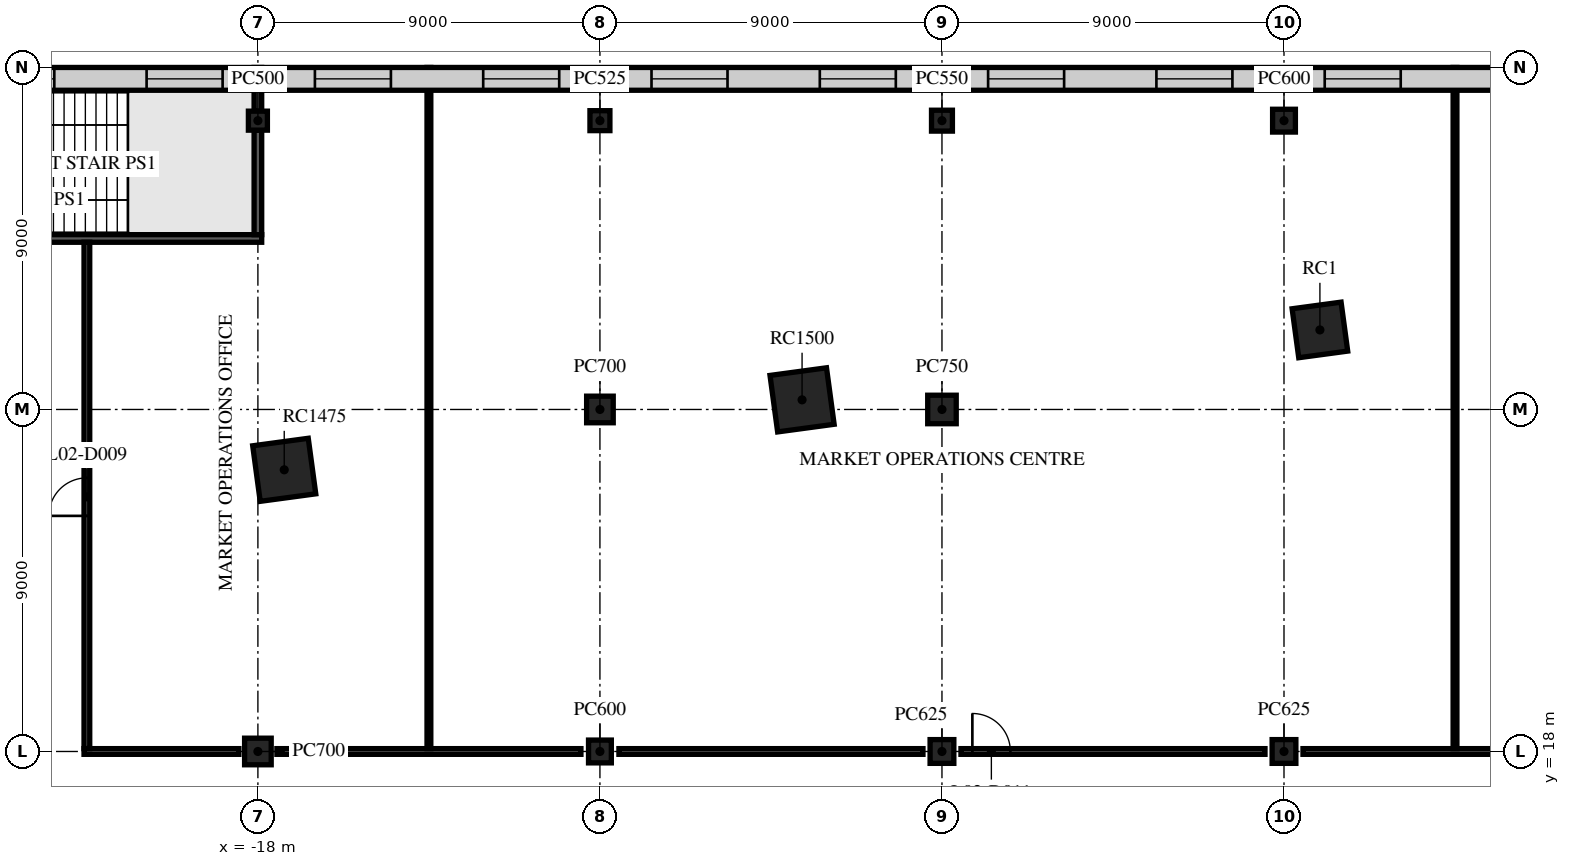
"""IFC4 building model, lengths in metres.
Left out: names, types, materials, properties, quantities, classifications, styles, units other than length and angle.
Written with IfcOpenShell. Run it as: python <this file> out.ifc"""

import sys

from ifc_helpers import new_model, si_unit, direction, frame, frame_2d, origin, origin_2d, place, context, subcontext, project, spatial, rectangle, extrude, element, fill, save


model = new_model("IFC4")
c1 = context("Model", 3, precision=1e-05, world=origin(), true_north=direction((0.0, 1.0)))
c2 = subcontext(c1, "Body", "Model", "MODEL_VIEW")
j1 = project(units=[si_unit("LENGTHUNIT", "METRE"), si_unit("PLANEANGLEUNIT", "RADIAN")], contexts=[c1])
p1 = place(None, origin())
s1 = spatial("IfcSite", under=j1, at=p1, CompositionType="ELEMENT")
p2 = place(p1, origin())
s2 = spatial("IfcBuilding", under=s1, at=p2, CompositionType="ELEMENT")
p3 = place(p2, frame((0.0, 0.0, 9.0)))
s3 = spatial("IfcBuildingStorey", under=s2, at=p3, CompositionType="ELEMENT", Elevation=9.0)
p4 = place(p3, frame((-18.0, 18.0, 0.0), z_axis=(0.0, 0.0, 1.0), x_axis=(1.0, 0.0, 0.0)))
e1 = element("IfcColumn", 1, at=p4, inside=s3, PredefinedType="COLUMN", context=c2, shape_type="SweptSolid", body=[
    extrude(rectangle(XDim=0.7, YDim=0.7, at=origin_2d()), origin(), (0.0, 0.0, 1.0), 4.5),
])
p5 = place(p3, frame((-18.0, 34.6, 0.0), z_axis=(0.0, 0.0, 1.0), x_axis=(1.0, 0.0, 0.0)))
e2 = element("IfcColumn", 2, at=p5, inside=s3, PredefinedType="COLUMN", context=c2, shape_type="SweptSolid", body=[
    extrude(rectangle(XDim=0.5, YDim=0.5, at=origin_2d()), origin(), (0.0, 0.0, 1.0), 4.5),
])
p6 = place(p3, frame((-9.0, 18.0, 0.0), z_axis=(0.0, 0.0, 1.0), x_axis=(1.0, 0.0, 0.0)))
e3 = element("IfcColumn", 3, at=p6, inside=s3, PredefinedType="COLUMN", context=c2, shape_type="SweptSolid", body=[
    extrude(rectangle(XDim=0.6, YDim=0.6, at=origin_2d()), origin(), (0.0, 0.0, 1.0), 4.5),
])
p7 = place(p3, frame((-9.0, 27.0, 0.0), z_axis=(0.0, 0.0, 1.0), x_axis=(1.0, 0.0, 0.0)))
e4 = element("IfcColumn", 4, at=p7, inside=s3, PredefinedType="COLUMN", context=c2, shape_type="SweptSolid", body=[
    extrude(rectangle(XDim=0.7, YDim=0.7, at=origin_2d()), origin(), (0.0, 0.0, 1.0), 4.5),
])
p8 = place(p3, frame((-9.0, 34.6, 0.0), z_axis=(0.0, 0.0, 1.0), x_axis=(1.0, 0.0, 0.0)))
e5 = element("IfcColumn", 5, at=p8, inside=s3, PredefinedType="COLUMN", context=c2, shape_type="SweptSolid", body=[
    extrude(rectangle(XDim=0.525, YDim=0.525, at=origin_2d()), origin(), (0.0, 0.0, 1.0), 4.5),
])
p9 = place(p3, frame((0.0, 18.0, 0.0), z_axis=(0.0, 0.0, 1.0), x_axis=(1.0, 0.0, 0.0)))
e6 = element("IfcColumn", 6, at=p9, inside=s3, PredefinedType="COLUMN", context=c2, shape_type="SweptSolid", body=[
    extrude(rectangle(XDim=0.625, YDim=0.625, at=origin_2d()), origin(), (0.0, 0.0, 1.0), 4.5),
])
p10 = place(p3, frame((0.0, 27.0, 0.0), z_axis=(0.0, 0.0, 1.0), x_axis=(1.0, 0.0, 0.0)))
e7 = element("IfcColumn", 7, at=p10, inside=s3, PredefinedType="COLUMN", context=c2, shape_type="SweptSolid", body=[
    extrude(rectangle(XDim=0.75, YDim=0.75, at=origin_2d()), origin(), (0.0, 0.0, 1.0), 4.5),
])
p11 = place(p3, frame((0.0, 34.6, 0.0), z_axis=(0.0, 0.0, 1.0), x_axis=(1.0, 0.0, 0.0)))
e8 = element("IfcColumn", 8, at=p11, inside=s3, PredefinedType="COLUMN", context=c2, shape_type="SweptSolid", body=[
    extrude(rectangle(XDim=0.55, YDim=0.55, at=origin_2d()), origin(), (0.0, 0.0, 1.0), 4.5),
])
p12 = place(p3, frame((9.0, 18.0, 0.0), z_axis=(0.0, 0.0, 1.0), x_axis=(1.0, 0.0, 0.0)))
e9 = element("IfcColumn", 9, at=p12, inside=s3, PredefinedType="COLUMN", context=c2, shape_type="SweptSolid", body=[
    extrude(rectangle(XDim=0.625, YDim=0.625, at=origin_2d()), origin(), (0.0, 0.0, 1.0), 4.5),
])
p13 = place(p3, frame((9.0, 34.6, 0.0), z_axis=(0.0, 0.0, 1.0), x_axis=(1.0, 0.0, 0.0)))
e10 = element("IfcColumn", 10, at=p13, inside=s3, PredefinedType="COLUMN", context=c2, shape_type="SweptSolid", body=[
    extrude(rectangle(XDim=0.6, YDim=0.6, at=origin_2d()), origin(), (0.0, 0.0, 1.0), 4.5),
])
p14 = place(p3, frame((9.945, 29.093, 0.0), z_axis=(0.0, 0.0, 1.0), x_axis=(0.991001197216, 0.133853005627, 0.0)))
e11 = element("IfcColumn", 11, at=p14, inside=s3, PredefinedType="COLUMN", context=c2, shape_type="SweptSolid", body=[
    extrude(rectangle(XDim=1.3, YDim=1.3, at=origin_2d()), origin(), (0.0, 0.0, 1.0), 4.5),
])
p15 = place(p3, frame((-3.681, 27.253, 0.0), z_axis=(0.0, 0.0, 1.0), x_axis=(0.991001197216, 0.133853005627, 0.0)))
e12 = element("IfcColumn", 12, at=p15, inside=s3, PredefinedType="COLUMN", context=c2, shape_type="SweptSolid", body=[
    extrude(rectangle(XDim=1.5, YDim=1.5, at=origin_2d()), origin(), (0.0, 0.0, 1.0), 4.5),
])
p16 = place(p3, frame((-17.307, 25.412, 0.0), z_axis=(0.0, 0.0, 1.0), x_axis=(0.991001197216, 0.133853005627, 0.0)))
e13 = element("IfcColumn", 13, at=p16, inside=s3, PredefinedType="COLUMN", context=c2, shape_type="SweptSolid", body=[
    extrude(rectangle(XDim=1.475, YDim=1.475, at=origin_2d()), origin(), (0.0, 0.0, 1.0), 4.5),
])
p17 = place(p3, frame((-22.575, 18.0, 0.0), z_axis=(0.0, 0.0, 1.0), x_axis=(1.0, 0.0, 0.0)))
e14 = element("IfcWall", 14, at=p17, inside=s3, PredefinedType="PARTITIONING", context=c2, shape_type="SweptSolid", body=[
    extrude(rectangle(XDim=4.075, YDim=0.15, at=frame_2d((2.038, 0.0))), origin(), (0.0, 0.0, 1.0), 4.1),
])
for number, where, z_axis, x_axis in (
    (15, (-17.5, 18.0, 0.0), (0.0, 0.0, 1.0), (1.0, 0.0, 0.0)),
    (16, (-8.5, 18.0, 0.0), (0.0, 0.0, 1.0), (1.0, 0.0, 0.0)),
):
    element("IfcWall", number, at=place(p3, frame(where, z_axis=z_axis, x_axis=x_axis)), inside=s3, PredefinedType="PARTITIONING", context=c2, shape_type="SweptSolid", body=[
        extrude(rectangle(XDim=8.0, YDim=0.15, at=frame_2d((4.0, 0.0))), origin(), (0.0, 0.0, 1.0), 4.1),
    ])
p18 = place(p3, frame((0.5, 18.0, 0.0), z_axis=(0.0, 0.0, 1.0), x_axis=(1.0, 0.0, 0.0)))
e17 = element("IfcWall", 17, at=p18, inside=s3, PredefinedType="PARTITIONING", context=c2, shape_type="SweptSolid", body=[
    extrude(rectangle(XDim=8.0, YDim=0.15, at=frame_2d((4.0, 0.0))), origin(), (0.0, 0.0, 1.0), 4.1),
])
p19 = place(p18, frame((0.3, 0.0, 0.0)))
e18 = element("IfcOpeningElement", 18, at=p19, cuts=e17, PredefinedType="OPENING", context=c2, shape_type="SweptSolid", body=[
    extrude(rectangle(XDim=1.0, YDim=2.1, at=frame_2d((0.5, 1.05))), frame((0.0, 0.085, 0.0), z_axis=(0.0, -1.0, 0.0), x_axis=(1.0, 0.0, 0.0)), (0.0, 0.0, 1.0), 0.17),
])
p20 = place(p3, frame((9.5, 18.0, 0.0), z_axis=(0.0, 0.0, 1.0), x_axis=(1.0, 0.0, 0.0)))
e19 = element("IfcWall", 19, at=p20, inside=s3, PredefinedType="PARTITIONING", context=c2, shape_type="SweptSolid", body=[
    extrude(rectangle(XDim=8.0, YDim=0.15, at=frame_2d((4.0, 0.0))), origin(), (0.0, 0.0, 1.0), 4.1),
])
p21 = place(p3, frame((-27.075, 31.5, 0.0), z_axis=(0.0, 0.0, 1.0), x_axis=(1.0, 0.0, 0.0)))
e20 = element("IfcWall", 20, at=p21, inside=s3, PredefinedType="PARTITIONING", context=c2, shape_type="SweptSolid", body=[
    extrude(rectangle(XDim=9.175, YDim=0.2, at=frame_2d((4.587, 0.0))), origin(), (0.0, 0.0, 1.0), 4.1),
])
p22 = place(p21, frame((0.875, 0.0, 0.0)))
e21 = element("IfcOpeningElement", 21, at=p22, cuts=e20, PredefinedType="OPENING", context=c2, shape_type="SweptSolid", body=[
    extrude(rectangle(XDim=1.2, YDim=2.1, at=frame_2d((0.6, 1.05))), frame((0.0, 0.11, 0.0), z_axis=(0.0, -1.0, 0.0), x_axis=(1.0, 0.0, 0.0)), (0.0, 0.0, 1.0), 0.22),
])
p23 = place(p3, frame((-22.5, 18.075, 0.0), z_axis=(0.0, 0.0, 1.0), x_axis=(0.0, 1.0, 0.0)))
e22 = element("IfcWall", 22, at=p23, inside=s3, PredefinedType="PARTITIONING", context=c2, shape_type="SweptSolid", body=[
    extrude(rectangle(XDim=13.325, YDim=0.15, at=frame_2d((6.663, 0.0))), origin(), (0.0, 0.0, 1.0), 4.1),
])
p24 = place(p23, frame((6.125, 0.0, 0.0)))
e23 = element("IfcOpeningElement", 23, at=p24, cuts=e22, PredefinedType="OPENING", context=c2, shape_type="SweptSolid", body=[
    extrude(rectangle(XDim=1.0, YDim=2.1, at=frame_2d((0.5, 1.05))), frame((0.0, 0.085, 0.0), z_axis=(0.0, -1.0, 0.0), x_axis=(1.0, 0.0, 0.0)), (0.0, 0.0, 1.0), 0.17),
])
p25 = place(p3, frame((-18.0, 31.6, 0.0), z_axis=(0.0, 0.0, 1.0), x_axis=(0.0, 1.0, 0.0)))
e24 = element("IfcWall", 24, at=p25, inside=s3, PredefinedType="PARTITIONING", context=c2, shape_type="SweptSolid", body=[
    extrude(rectangle(XDim=2.75, YDim=0.2, at=frame_2d((1.375, 0.0))), origin(), (0.0, 0.0, 1.0), 4.1),
])
p26 = place(p3, frame((-18.0, 34.85, 0.0), z_axis=(0.0, 0.0, 1.0), x_axis=(0.0, 1.0, 0.0)))
e25 = element("IfcWall", 25, at=p26, inside=s3, PredefinedType="PARTITIONING", context=c2, shape_type="SweptSolid", body=[
    extrude(rectangle(XDim=1.15, YDim=0.2, at=frame_2d((0.575, 0.0))), origin(), (0.0, 0.0, 1.0), 4.1),
])
for number, where, z_axis, x_axis in (
    (26, (-13.5, 18.075, 0.0), (0.0, 0.0, 1.0), (0.0, 1.0, 0.0)),
    (27, (13.5, 18.075, 0.0), (0.0, 0.0, 1.0), (0.0, 1.0, 0.0)),
):
    element("IfcWall", number, at=place(p3, frame(where, z_axis=z_axis, x_axis=x_axis)), inside=s3, PredefinedType="PARTITIONING", context=c2, shape_type="SweptSolid", body=[
        extrude(rectangle(XDim=17.925, YDim=0.1, at=frame_2d((8.962, 0.0))), origin(), (0.0, 0.0, 1.0), 4.1),
    ])
p27 = place(p3, frame((30.876, 35.7, 0.0), z_axis=(0.0, 0.0, 1.0), x_axis=(-1.0, 0.0, 0.0)))
e28 = element("IfcWall", 28, at=p27, inside=s3, PredefinedType="STANDARD", context=c2, shape_type="SweptSolid", body=[
    extrude(rectangle(XDim=61.751, YDim=0.6, at=frame_2d((30.876, 0.0))), origin(), (0.0, 0.0, 1.0), 4.1),
])
p28 = place(p27, frame((1.152, 0.0, 0.9)))
e29 = element("IfcOpeningElement", 29, at=p28, cuts=e28, PredefinedType="OPENING", context=c2, shape_type="SweptSolid", body=[
    extrude(rectangle(XDim=2.0, YDim=3.0, at=frame_2d((1.0, 1.5))), frame((0.0, 0.31, 0.0), z_axis=(0.0, -1.0, 0.0), x_axis=(1.0, 0.0, 0.0)), (0.0, 0.0, 1.0), 0.62),
])
p29 = place(p27, frame((5.519, 0.0, 0.9)))
e30 = element("IfcOpeningElement", 30, at=p29, cuts=e28, PredefinedType="OPENING", context=c2, shape_type="SweptSolid", body=[
    extrude(rectangle(XDim=2.0, YDim=3.0, at=frame_2d((1.0, 1.5))), frame((0.0, 0.31, 0.0), z_axis=(0.0, -1.0, 0.0), x_axis=(1.0, 0.0, 0.0)), (0.0, 0.0, 1.0), 0.62),
])
p30 = place(p27, frame((9.947, 0.0, 0.9)))
e31 = element("IfcOpeningElement", 31, at=p30, cuts=e28, PredefinedType="OPENING", context=c2, shape_type="SweptSolid", body=[
    extrude(rectangle(XDim=2.0, YDim=3.0, at=frame_2d((1.0, 1.5))), frame((0.0, 0.31, 0.0), z_axis=(0.0, -1.0, 0.0), x_axis=(1.0, 0.0, 0.0)), (0.0, 0.0, 1.0), 0.62),
])
p31 = place(p27, frame((14.376, 0.0, 0.9)))
e32 = element("IfcOpeningElement", 32, at=p31, cuts=e28, PredefinedType="OPENING", context=c2, shape_type="SweptSolid", body=[
    extrude(rectangle(XDim=2.0, YDim=3.0, at=frame_2d((1.0, 1.5))), frame((0.0, 0.31, 0.0), z_axis=(0.0, -1.0, 0.0), x_axis=(1.0, 0.0, 0.0)), (0.0, 0.0, 1.0), 0.62),
])
p32 = place(p27, frame((18.804, 0.0, 0.9)))
e33 = element("IfcOpeningElement", 33, at=p32, cuts=e28, PredefinedType="OPENING", context=c2, shape_type="SweptSolid", body=[
    extrude(rectangle(XDim=2.0, YDim=3.0, at=frame_2d((1.0, 1.5))), frame((0.0, 0.31, 0.0), z_axis=(0.0, -1.0, 0.0), x_axis=(1.0, 0.0, 0.0)), (0.0, 0.0, 1.0), 0.62),
])
p33 = place(p27, frame((23.233, 0.0, 0.9)))
e34 = element("IfcOpeningElement", 34, at=p33, cuts=e28, PredefinedType="OPENING", context=c2, shape_type="SweptSolid", body=[
    extrude(rectangle(XDim=2.0, YDim=3.0, at=frame_2d((1.0, 1.5))), frame((0.0, 0.31, 0.0), z_axis=(0.0, -1.0, 0.0), x_axis=(1.0, 0.0, 0.0)), (0.0, 0.0, 1.0), 0.62),
])
p34 = place(p27, frame((27.662, 0.0, 0.9)))
e35 = element("IfcOpeningElement", 35, at=p34, cuts=e28, PredefinedType="OPENING", context=c2, shape_type="SweptSolid", body=[
    extrude(rectangle(XDim=2.0, YDim=3.0, at=frame_2d((1.0, 1.5))), frame((0.0, 0.31, 0.0), z_axis=(0.0, -1.0, 0.0), x_axis=(1.0, 0.0, 0.0)), (0.0, 0.0, 1.0), 0.62),
])
p35 = place(p27, frame((32.09, 0.0, 0.9)))
e36 = element("IfcOpeningElement", 36, at=p35, cuts=e28, PredefinedType="OPENING", context=c2, shape_type="SweptSolid", body=[
    extrude(rectangle(XDim=2.0, YDim=3.0, at=frame_2d((1.0, 1.5))), frame((0.0, 0.31, 0.0), z_axis=(0.0, -1.0, 0.0), x_axis=(1.0, 0.0, 0.0)), (0.0, 0.0, 1.0), 0.62),
])
p36 = place(p27, frame((36.519, 0.0, 0.9)))
e37 = element("IfcOpeningElement", 37, at=p36, cuts=e28, PredefinedType="OPENING", context=c2, shape_type="SweptSolid", body=[
    extrude(rectangle(XDim=2.0, YDim=3.0, at=frame_2d((1.0, 1.5))), frame((0.0, 0.31, 0.0), z_axis=(0.0, -1.0, 0.0), x_axis=(1.0, 0.0, 0.0)), (0.0, 0.0, 1.0), 0.62),
])
p37 = place(p27, frame((40.947, 0.0, 0.9)))
e38 = element("IfcOpeningElement", 38, at=p37, cuts=e28, PredefinedType="OPENING", context=c2, shape_type="SweptSolid", body=[
    extrude(rectangle(XDim=2.0, YDim=3.0, at=frame_2d((1.0, 1.5))), frame((0.0, 0.31, 0.0), z_axis=(0.0, -1.0, 0.0), x_axis=(1.0, 0.0, 0.0)), (0.0, 0.0, 1.0), 0.62),
])
p38 = place(p27, frame((45.376, 0.0, 0.9)))
e39 = element("IfcOpeningElement", 39, at=p38, cuts=e28, PredefinedType="OPENING", context=c2, shape_type="SweptSolid", body=[
    extrude(rectangle(XDim=2.0, YDim=3.0, at=frame_2d((1.0, 1.5))), frame((0.0, 0.31, 0.0), z_axis=(0.0, -1.0, 0.0), x_axis=(1.0, 0.0, 0.0)), (0.0, 0.0, 1.0), 0.62),
])
p39 = place(p27, frame((49.804, 0.0, 0.9)))
e40 = element("IfcOpeningElement", 40, at=p39, cuts=e28, PredefinedType="OPENING", context=c2, shape_type="SweptSolid", body=[
    extrude(rectangle(XDim=2.0, YDim=3.0, at=frame_2d((1.0, 1.5))), frame((0.0, 0.31, 0.0), z_axis=(0.0, -1.0, 0.0), x_axis=(1.0, 0.0, 0.0)), (0.0, 0.0, 1.0), 0.62),
])
p40 = place(p27, frame((54.233, 0.0, 0.9)))
e41 = element("IfcOpeningElement", 41, at=p40, cuts=e28, PredefinedType="OPENING", context=c2, shape_type="SweptSolid", body=[
    extrude(rectangle(XDim=2.0, YDim=3.0, at=frame_2d((1.0, 1.5))), frame((0.0, 0.31, 0.0), z_axis=(0.0, -1.0, 0.0), x_axis=(1.0, 0.0, 0.0)), (0.0, 0.0, 1.0), 0.62),
])
p41 = place(p27, frame((58.599, 0.0, 0.9)))
e42 = element("IfcOpeningElement", 42, at=p41, cuts=e28, PredefinedType="OPENING", context=c2, shape_type="SweptSolid", body=[
    extrude(rectangle(XDim=2.0, YDim=3.0, at=frame_2d((1.0, 1.5))), frame((0.0, 0.31, 0.0), z_axis=(0.0, -1.0, 0.0), x_axis=(1.0, 0.0, 0.0)), (0.0, 0.0, 1.0), 0.62),
])
p42 = place(p24, origin())
e43 = element("IfcDoor", 43, at=p42, inside=s3, OperationType="SINGLE_SWING_LEFT", PredefinedType="DOOR", context=c2, shape_type="SweptSolid", body=[
    extrude(rectangle(XDim=1.0, YDim=2.1, at=frame_2d((0.5, 1.05))), frame((0.0, 0.025, 0.0), z_axis=(0.0, -1.0, 0.0), x_axis=(1.0, 0.0, 0.0)), (0.0, 0.0, 1.0), 0.05),
])
fill(e23, e43)
p43 = place(p19, origin())
e44 = element("IfcDoor", 44, at=p43, inside=s3, OperationType="SINGLE_SWING_LEFT", PredefinedType="DOOR", context=c2, shape_type="SweptSolid", body=[
    extrude(rectangle(XDim=1.0, YDim=2.1, at=frame_2d((0.5, 1.05))), frame((0.0, 0.025, 0.0), z_axis=(0.0, -1.0, 0.0), x_axis=(1.0, 0.0, 0.0)), (0.0, 0.0, 1.0), 0.05),
])
fill(e18, e44)
p44 = place(p32, origin())
e45 = element("IfcWindow", 45, at=p44, inside=s3, PartitioningType="SINGLE_PANEL", PredefinedType="WINDOW", context=c2, shape_type="SweptSolid", body=[
    extrude(rectangle(XDim=2.0, YDim=3.0, at=frame_2d((1.0, 1.5))), frame((0.0, 0.03, 0.0), z_axis=(0.0, -1.0, 0.0), x_axis=(1.0, 0.0, 0.0)), (0.0, 0.0, 1.0), 0.06),
])
fill(e33, e45)
p45 = place(p33, origin())
e46 = element("IfcWindow", 46, at=p45, inside=s3, PartitioningType="SINGLE_PANEL", PredefinedType="WINDOW", context=c2, shape_type="SweptSolid", body=[
    extrude(rectangle(XDim=2.0, YDim=3.0, at=frame_2d((1.0, 1.5))), frame((0.0, 0.03, 0.0), z_axis=(0.0, -1.0, 0.0), x_axis=(1.0, 0.0, 0.0)), (0.0, 0.0, 1.0), 0.06),
])
fill(e34, e46)
p46 = place(p34, origin())
e47 = element("IfcWindow", 47, at=p46, inside=s3, PartitioningType="SINGLE_PANEL", PredefinedType="WINDOW", context=c2, shape_type="SweptSolid", body=[
    extrude(rectangle(XDim=2.0, YDim=3.0, at=frame_2d((1.0, 1.5))), frame((0.0, 0.03, 0.0), z_axis=(0.0, -1.0, 0.0), x_axis=(1.0, 0.0, 0.0)), (0.0, 0.0, 1.0), 0.06),
])
fill(e35, e47)
p47 = place(p35, origin())
e48 = element("IfcWindow", 48, at=p47, inside=s3, PartitioningType="SINGLE_PANEL", PredefinedType="WINDOW", context=c2, shape_type="SweptSolid", body=[
    extrude(rectangle(XDim=2.0, YDim=3.0, at=frame_2d((1.0, 1.5))), frame((0.0, 0.03, 0.0), z_axis=(0.0, -1.0, 0.0), x_axis=(1.0, 0.0, 0.0)), (0.0, 0.0, 1.0), 0.06),
])
fill(e36, e48)
p48 = place(p36, origin())
e49 = element("IfcWindow", 49, at=p48, inside=s3, PartitioningType="SINGLE_PANEL", PredefinedType="WINDOW", context=c2, shape_type="SweptSolid", body=[
    extrude(rectangle(XDim=2.0, YDim=3.0, at=frame_2d((1.0, 1.5))), frame((0.0, 0.03, 0.0), z_axis=(0.0, -1.0, 0.0), x_axis=(1.0, 0.0, 0.0)), (0.0, 0.0, 1.0), 0.06),
])
fill(e37, e49)
p49 = place(p37, origin())
e50 = element("IfcWindow", 50, at=p49, inside=s3, PartitioningType="SINGLE_PANEL", PredefinedType="WINDOW", context=c2, shape_type="SweptSolid", body=[
    extrude(rectangle(XDim=2.0, YDim=3.0, at=frame_2d((1.0, 1.5))), frame((0.0, 0.03, 0.0), z_axis=(0.0, -1.0, 0.0), x_axis=(1.0, 0.0, 0.0)), (0.0, 0.0, 1.0), 0.06),
])
fill(e38, e50)
p50 = place(p38, origin())
e51 = element("IfcWindow", 51, at=p50, inside=s3, PartitioningType="SINGLE_PANEL", PredefinedType="WINDOW", context=c2, shape_type="SweptSolid", body=[
    extrude(rectangle(XDim=2.0, YDim=3.0, at=frame_2d((1.0, 1.5))), frame((0.0, 0.03, 0.0), z_axis=(0.0, -1.0, 0.0), x_axis=(1.0, 0.0, 0.0)), (0.0, 0.0, 1.0), 0.06),
])
fill(e39, e51)
p51 = place(p39, origin())
e52 = element("IfcWindow", 52, at=p51, inside=s3, PartitioningType="SINGLE_PANEL", PredefinedType="WINDOW", context=c2, shape_type="SweptSolid", body=[
    extrude(rectangle(XDim=2.0, YDim=3.0, at=frame_2d((1.0, 1.5))), frame((0.0, 0.03, 0.0), z_axis=(0.0, -1.0, 0.0), x_axis=(1.0, 0.0, 0.0)), (0.0, 0.0, 1.0), 0.06),
])
fill(e40, e52)
p52 = place(p40, origin())
e53 = element("IfcWindow", 53, at=p52, inside=s3, PartitioningType="SINGLE_PANEL", PredefinedType="WINDOW", context=c2, shape_type="SweptSolid", body=[
    extrude(rectangle(XDim=2.0, YDim=3.0, at=frame_2d((1.0, 1.5))), frame((0.0, 0.03, 0.0), z_axis=(0.0, -1.0, 0.0), x_axis=(1.0, 0.0, 0.0)), (0.0, 0.0, 1.0), 0.06),
])
fill(e41, e53)
save(model, sys.argv[1])
